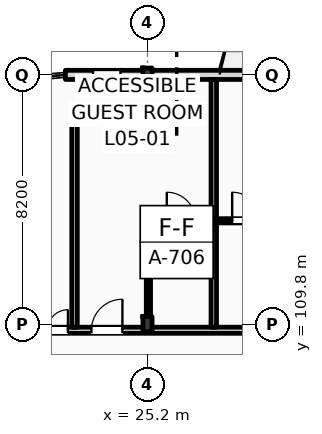
"""IFC4 building model, lengths in metres.
Left out: names, types, materials, properties, quantities, classifications, styles, units other than length and angle.
Written with IfcOpenShell. Run it as: python <this file> out.ifc"""

import sys

from ifc_helpers import new_model, si_unit, direction, frame, frame_2d, origin, origin_2d, place, context, subcontext, project, spatial, rectangle, i_section, extrude, element, fill, save


model = new_model("IFC4")
c1 = context("Model", 3, precision=1e-05, world=origin(), true_north=direction((0.0, 1.0)))
c2 = subcontext(c1, "Body", "Model", "MODEL_VIEW")
j1 = project(units=[si_unit("LENGTHUNIT", "METRE"), si_unit("PLANEANGLEUNIT", "RADIAN")], contexts=[c1])
p1 = place(None, origin())
s1 = spatial("IfcSite", under=j1, at=p1, CompositionType="ELEMENT")
p2 = place(p1, origin())
s2 = spatial("IfcBuilding", under=s1, at=p2, CompositionType="ELEMENT")
p3 = place(p2, frame((0.0, 0.0, 24.6)))
s3 = spatial("IfcBuildingStorey", under=s2, at=p3, CompositionType="ELEMENT", Elevation=24.6)
p4 = place(p3, frame((25.2, 109.8, 0.0), z_axis=(0.0, 0.0, 1.0), x_axis=(1.0, 0.0, 0.0)))
e1 = element("IfcColumn", 1, at=p4, inside=s3, PredefinedType="COLUMN", context=c2, shape_type="SweptSolid", body=[
    extrude(i_section(OverallWidth=0.3, OverallDepth=0.5, WebThickness=0.014, FlangeThickness=0.028, FilletRadius=0.027, at=origin_2d()), origin(), (0.0, 0.0, 1.0), 3.6),
])
p5 = place(p3, frame((25.2, 118.0, 0.0), z_axis=(0.0, 0.0, 1.0), x_axis=(1.0, 0.0, 0.0)))
e2 = element("IfcColumn", 2, at=p5, inside=s3, PredefinedType="COLUMN", context=c2, shape_type="SweptSolid", body=[
    extrude(i_section(OverallWidth=0.3, OverallDepth=0.45, WebThickness=0.014, FlangeThickness=0.026, FilletRadius=0.027, at=origin_2d()), origin(), (0.0, 0.0, 1.0), 3.6),
])
p6 = place(p3, frame((22.5, 118.0, 0.0), z_axis=(0.0, 0.0, 1.0), x_axis=(1.0, 0.0, 0.0)))
e3 = element("IfcWall", 3, at=p6, inside=s3, PredefinedType="STANDARD", context=c2, shape_type="SweptSolid", body=[
    extrude(rectangle(XDim=97.5, YDim=0.3, at=frame_2d((48.75, 0.0))), origin(), (0.0, 0.0, 1.0), 2.78),
])
p7 = place(p6, frame((0.91, 0.0, 0.9)))
e4 = element("IfcOpeningElement", 4, at=p7, cuts=e3, PredefinedType="OPENING", context=c2, shape_type="SweptSolid", body=[
    extrude(rectangle(XDim=0.9, YDim=1.7, at=frame_2d((0.45, 0.85))), frame((0.0, 0.16, 0.0), z_axis=(0.0, -1.0, 0.0), x_axis=(1.0, 0.0, 0.0)), (0.0, 0.0, 1.0), 0.32),
])
p8 = place(p6, frame((6.275, 0.0, 0.0)))
e5 = element("IfcOpeningElement", 5, at=p8, cuts=e3, PredefinedType="OPENING", context=c2, shape_type="SweptSolid", body=[
    extrude(rectangle(XDim=1.2, YDim=2.25, at=frame_2d((0.6, 1.125))), frame((0.0, 0.16, 0.0), z_axis=(0.0, -1.0, 0.0), x_axis=(1.0, 0.0, 0.0)), (0.0, 0.0, 1.0), 0.32),
])
p9 = place(p6, frame((11.42, 0.0, 0.9)))
e6 = element("IfcOpeningElement", 6, at=p9, cuts=e3, PredefinedType="OPENING", context=c2, shape_type="SweptSolid", body=[
    extrude(rectangle(XDim=1.35, YDim=1.7, at=frame_2d((0.675, 0.85))), frame((0.0, 0.16, 0.0), z_axis=(0.0, -1.0, 0.0), x_axis=(1.0, 0.0, 0.0)), (0.0, 0.0, 1.0), 0.32),
])
p10 = place(p6, frame((14.345, 0.0, 0.9)))
e7 = element("IfcOpeningElement", 7, at=p10, cuts=e3, PredefinedType="OPENING", context=c2, shape_type="SweptSolid", body=[
    extrude(rectangle(XDim=1.8, YDim=1.7, at=frame_2d((0.9, 0.85))), frame((0.0, 0.16, 0.0), z_axis=(0.0, -1.0, 0.0), x_axis=(1.0, 0.0, 0.0)), (0.0, 0.0, 1.0), 0.32),
])
p11 = place(p6, frame((19.27, 0.0, 0.9)))
e8 = element("IfcOpeningElement", 8, at=p11, cuts=e3, PredefinedType="OPENING", context=c2, shape_type="SweptSolid", body=[
    extrude(rectangle(XDim=1.95, YDim=1.7, at=frame_2d((0.975, 0.85))), frame((0.0, 0.16, 0.0), z_axis=(0.0, -1.0, 0.0), x_axis=(1.0, 0.0, 0.0)), (0.0, 0.0, 1.0), 0.32),
])
p12 = place(p6, frame((22.97, 0.0, 0.0)))
e9 = element("IfcOpeningElement", 9, at=p12, cuts=e3, PredefinedType="OPENING", context=c2, shape_type="SweptSolid", body=[
    extrude(rectangle(XDim=1.2, YDim=2.25, at=frame_2d((0.6, 1.125))), frame((0.0, 0.16, 0.0), z_axis=(0.0, -1.0, 0.0), x_axis=(1.0, 0.0, 0.0)), (0.0, 0.0, 1.0), 0.32),
])
p13 = place(p6, frame((26.92, 0.0, 0.9)))
e10 = element("IfcOpeningElement", 10, at=p13, cuts=e3, PredefinedType="OPENING", context=c2, shape_type="SweptSolid", body=[
    extrude(rectangle(XDim=2.25, YDim=1.7, at=frame_2d((1.125, 0.85))), frame((0.0, 0.16, 0.0), z_axis=(0.0, -1.0, 0.0), x_axis=(1.0, 0.0, 0.0)), (0.0, 0.0, 1.0), 0.32),
])
p14 = place(p6, frame((30.645, 0.0, 0.9)))
e11 = element("IfcOpeningElement", 11, at=p14, cuts=e3, PredefinedType="OPENING", context=c2, shape_type="SweptSolid", body=[
    extrude(rectangle(XDim=2.4, YDim=1.7, at=frame_2d((1.2, 0.85))), frame((0.0, 0.16, 0.0), z_axis=(0.0, -1.0, 0.0), x_axis=(1.0, 0.0, 0.0)), (0.0, 0.0, 1.0), 0.32),
])
p15 = place(p6, frame((36.71, 0.0, 0.0)))
e12 = element("IfcOpeningElement", 12, at=p15, cuts=e3, PredefinedType="OPENING", context=c2, shape_type="SweptSolid", body=[
    extrude(rectangle(XDim=1.2, YDim=2.25, at=frame_2d((0.6, 1.125))), frame((0.0, 0.16, 0.0), z_axis=(0.0, -1.0, 0.0), x_axis=(1.0, 0.0, 0.0)), (0.0, 0.0, 1.0), 0.32),
])
p16 = place(p6, frame((39.17, 0.0, 0.0)))
e13 = element("IfcOpeningElement", 13, at=p16, cuts=e3, PredefinedType="OPENING", context=c2, shape_type="SweptSolid", body=[
    extrude(rectangle(XDim=1.2, YDim=2.25, at=frame_2d((0.6, 1.125))), frame((0.0, 0.16, 0.0), z_axis=(0.0, -1.0, 0.0), x_axis=(1.0, 0.0, 0.0)), (0.0, 0.0, 1.0), 0.32),
])
p17 = place(p6, frame((43.22, 0.0, 0.9)))
e14 = element("IfcOpeningElement", 14, at=p17, cuts=e3, PredefinedType="OPENING", context=c2, shape_type="SweptSolid", body=[
    extrude(rectangle(XDim=2.85, YDim=1.7, at=frame_2d((1.425, 0.85))), frame((0.0, 0.16, 0.0), z_axis=(0.0, -1.0, 0.0), x_axis=(1.0, 0.0, 0.0)), (0.0, 0.0, 1.0), 0.32),
])
p18 = place(p6, frame((47.29, 0.0, 0.9)))
e15 = element("IfcOpeningElement", 15, at=p18, cuts=e3, PredefinedType="OPENING", context=c2, shape_type="SweptSolid", body=[
    extrude(rectangle(XDim=1.35, YDim=1.7, at=frame_2d((0.675, 0.85))), frame((0.0, 0.16, 0.0), z_axis=(0.0, -1.0, 0.0), x_axis=(1.0, 0.0, 0.0)), (0.0, 0.0, 1.0), 0.32),
])
p19 = place(p6, frame((52.91, 0.0, 0.0)))
e16 = element("IfcOpeningElement", 16, at=p19, cuts=e3, PredefinedType="OPENING", context=c2, shape_type="SweptSolid", body=[
    extrude(rectangle(XDim=1.2, YDim=2.25, at=frame_2d((0.6, 1.125))), frame((0.0, 0.16, 0.0), z_axis=(0.0, -1.0, 0.0), x_axis=(1.0, 0.0, 0.0)), (0.0, 0.0, 1.0), 0.32),
])
p20 = place(p6, frame((55.69, 0.0, 0.9)))
e17 = element("IfcOpeningElement", 17, at=p20, cuts=e3, PredefinedType="OPENING", context=c2, shape_type="SweptSolid", body=[
    extrude(rectangle(XDim=0.9, YDim=1.7, at=frame_2d((0.45, 0.85))), frame((0.0, 0.16, 0.0), z_axis=(0.0, -1.0, 0.0), x_axis=(1.0, 0.0, 0.0)), (0.0, 0.0, 1.0), 0.32),
])
p21 = place(p6, frame((59.82, 0.0, 0.9)))
e18 = element("IfcOpeningElement", 18, at=p21, cuts=e3, PredefinedType="OPENING", context=c2, shape_type="SweptSolid", body=[
    extrude(rectangle(XDim=3.25, YDim=1.7, at=frame_2d((1.625, 0.85))), frame((0.0, 0.16, 0.0), z_axis=(0.0, -1.0, 0.0), x_axis=(1.0, 0.0, 0.0)), (0.0, 0.0, 1.0), 0.32),
])
p22 = place(p6, frame((65.89, 0.0, 0.9)))
e19 = element("IfcOpeningElement", 19, at=p22, cuts=e3, PredefinedType="OPENING", context=c2, shape_type="SweptSolid", body=[
    extrude(rectangle(XDim=1.1, YDim=1.7, at=frame_2d((0.55, 0.85))), frame((0.0, 0.16, 0.0), z_axis=(0.0, -1.0, 0.0), x_axis=(1.0, 0.0, 0.0)), (0.0, 0.0, 1.0), 0.32),
])
p23 = place(p6, frame((69.245, 0.0, 0.0)))
e20 = element("IfcOpeningElement", 20, at=p23, cuts=e3, PredefinedType="OPENING", context=c2, shape_type="SweptSolid", body=[
    extrude(rectangle(XDim=1.2, YDim=2.25, at=frame_2d((0.6, 1.125))), frame((0.0, 0.16, 0.0), z_axis=(0.0, -1.0, 0.0), x_axis=(1.0, 0.0, 0.0)), (0.0, 0.0, 1.0), 0.32),
])
p24 = place(p6, frame((73.69, 0.0, 0.9)))
e21 = element("IfcOpeningElement", 21, at=p24, cuts=e3, PredefinedType="OPENING", context=c2, shape_type="SweptSolid", body=[
    extrude(rectangle(XDim=1.8, YDim=1.7, at=frame_2d((0.9, 0.85))), frame((0.0, 0.16, 0.0), z_axis=(0.0, -1.0, 0.0), x_axis=(1.0, 0.0, 0.0)), (0.0, 0.0, 1.0), 0.32),
])
p25 = place(p6, frame((76.62, 0.0, 0.9)))
e22 = element("IfcOpeningElement", 22, at=p25, cuts=e3, PredefinedType="OPENING", context=c2, shape_type="SweptSolid", body=[
    extrude(rectangle(XDim=3.25, YDim=1.7, at=frame_2d((1.625, 0.85))), frame((0.0, 0.16, 0.0), z_axis=(0.0, -1.0, 0.0), x_axis=(1.0, 0.0, 0.0)), (0.0, 0.0, 1.0), 0.32),
])
p26 = place(p6, frame((81.895, 0.0, 0.9)))
e23 = element("IfcOpeningElement", 23, at=p26, cuts=e3, PredefinedType="OPENING", context=c2, shape_type="SweptSolid", body=[
    extrude(rectangle(XDim=1.1, YDim=1.5, at=frame_2d((0.55, 0.75))), frame((0.0, 0.16, 0.0), z_axis=(0.0, -1.0, 0.0), x_axis=(1.0, 0.0, 0.0)), (0.0, 0.0, 1.0), 0.32),
])
p27 = place(p6, frame((86.02, 0.0, 0.9)))
e24 = element("IfcOpeningElement", 24, at=p27, cuts=e3, PredefinedType="OPENING", context=c2, shape_type="SweptSolid", body=[
    extrude(rectangle(XDim=1.25, YDim=1.6, at=frame_2d((0.625, 0.8))), frame((0.0, 0.16, 0.0), z_axis=(0.0, -1.0, 0.0), x_axis=(1.0, 0.0, 0.0)), (0.0, 0.0, 1.0), 0.32),
])
p28 = place(p6, frame((90.145, 0.0, 0.9)))
e25 = element("IfcOpeningElement", 25, at=p28, cuts=e3, PredefinedType="OPENING", context=c2, shape_type="SweptSolid", body=[
    extrude(rectangle(XDim=1.4, YDim=1.7, at=frame_2d((0.7, 0.85))), frame((0.0, 0.16, 0.0), z_axis=(0.0, -1.0, 0.0), x_axis=(1.0, 0.0, 0.0)), (0.0, 0.0, 1.0), 0.32),
])
p29 = place(p6, frame((94.155, 0.0, 0.9)))
e26 = element("IfcOpeningElement", 26, at=p29, cuts=e3, PredefinedType="OPENING", context=c2, shape_type="SweptSolid", body=[
    extrude(rectangle(XDim=1.6, YDim=1.7, at=frame_2d((0.8, 0.85))), frame((0.0, 0.16, 0.0), z_axis=(0.0, -1.0, 0.0), x_axis=(1.0, 0.0, 0.0)), (0.0, 0.0, 1.0), 0.32),
])
p30 = place(p3, frame((10.65, 109.6, 0.0), z_axis=(0.0, 0.0, 1.0), x_axis=(1.0, 0.0, 0.0)))
e27 = element("IfcWall", 27, at=p30, inside=s3, PredefinedType="PARTITIONING", context=c2, shape_type="SweptSolid", body=[
    extrude(rectangle(XDim=109.21, YDim=0.2, at=frame_2d((54.605, 0.0))), origin(), (0.0, 0.0, 1.0), 2.78),
])
p31 = place(p30, frame((12.705, 0.0, 0.0)))
e28 = element("IfcOpeningElement", 28, at=p31, cuts=e27, PredefinedType="OPENING", context=c2, shape_type="SweptSolid", body=[
    extrude(rectangle(XDim=1.02, YDim=2.2, at=frame_2d((0.51, 1.1))), frame((0.0, 0.11, 0.0), z_axis=(0.0, -1.0, 0.0), x_axis=(1.0, 0.0, 0.0)), (0.0, 0.0, 1.0), 0.22),
])
p32 = place(p30, frame((19.26, 0.0, 0.0)))
e29 = element("IfcOpeningElement", 29, at=p32, cuts=e27, PredefinedType="OPENING", context=c2, shape_type="SweptSolid", body=[
    extrude(rectangle(XDim=1.02, YDim=2.2, at=frame_2d((0.51, 1.1))), frame((0.0, 0.11, 0.0), z_axis=(0.0, -1.0, 0.0), x_axis=(1.0, 0.0, 0.0)), (0.0, 0.0, 1.0), 0.22),
])
p33 = place(p30, frame((23.71, 0.0, 0.0)))
e30 = element("IfcOpeningElement", 30, at=p33, cuts=e27, PredefinedType="OPENING", context=c2, shape_type="SweptSolid", body=[
    extrude(rectangle(XDim=1.02, YDim=2.2, at=frame_2d((0.51, 1.1))), frame((0.0, 0.11, 0.0), z_axis=(0.0, -1.0, 0.0), x_axis=(1.0, 0.0, 0.0)), (0.0, 0.0, 1.0), 0.22),
])
p34 = place(p30, frame((27.66, 0.0, 0.0)))
e31 = element("IfcOpeningElement", 31, at=p34, cuts=e27, PredefinedType="OPENING", context=c2, shape_type="SweptSolid", body=[
    extrude(rectangle(XDim=1.02, YDim=2.2, at=frame_2d((0.51, 1.1))), frame((0.0, 0.11, 0.0), z_axis=(0.0, -1.0, 0.0), x_axis=(1.0, 0.0, 0.0)), (0.0, 0.0, 1.0), 0.22),
])
p35 = place(p30, frame((31.89, 0.0, 0.0)))
e32 = element("IfcOpeningElement", 32, at=p35, cuts=e27, PredefinedType="OPENING", context=c2, shape_type="SweptSolid", body=[
    extrude(rectangle(XDim=0.96, YDim=2.2, at=frame_2d((0.48, 1.1))), frame((0.0, 0.11, 0.0), z_axis=(0.0, -1.0, 0.0), x_axis=(1.0, 0.0, 0.0)), (0.0, 0.0, 1.0), 0.22),
])
p36 = place(p30, frame((33.94, 0.0, 0.0)))
e33 = element("IfcOpeningElement", 33, at=p36, cuts=e27, PredefinedType="OPENING", context=c2, shape_type="SweptSolid", body=[
    extrude(rectangle(XDim=0.96, YDim=2.2, at=frame_2d((0.48, 1.1))), frame((0.0, 0.11, 0.0), z_axis=(0.0, -1.0, 0.0), x_axis=(1.0, 0.0, 0.0)), (0.0, 0.0, 1.0), 0.22),
])
p37 = place(p30, frame((40.29, 0.0, 0.0)))
e34 = element("IfcOpeningElement", 34, at=p37, cuts=e27, PredefinedType="OPENING", context=c2, shape_type="SweptSolid", body=[
    extrude(rectangle(XDim=0.96, YDim=2.2, at=frame_2d((0.48, 1.1))), frame((0.0, 0.11, 0.0), z_axis=(0.0, -1.0, 0.0), x_axis=(1.0, 0.0, 0.0)), (0.0, 0.0, 1.0), 0.22),
])
p38 = place(p30, frame((42.34, 0.0, 0.0)))
e35 = element("IfcOpeningElement", 35, at=p38, cuts=e27, PredefinedType="OPENING", context=c2, shape_type="SweptSolid", body=[
    extrude(rectangle(XDim=0.96, YDim=2.2, at=frame_2d((0.48, 1.1))), frame((0.0, 0.11, 0.0), z_axis=(0.0, -1.0, 0.0), x_axis=(1.0, 0.0, 0.0)), (0.0, 0.0, 1.0), 0.22),
])
p39 = place(p30, frame((48.69, 0.0, 0.0)))
e36 = element("IfcOpeningElement", 36, at=p39, cuts=e27, PredefinedType="OPENING", context=c2, shape_type="SweptSolid", body=[
    extrude(rectangle(XDim=0.96, YDim=2.2, at=frame_2d((0.48, 1.1))), frame((0.0, 0.11, 0.0), z_axis=(0.0, -1.0, 0.0), x_axis=(1.0, 0.0, 0.0)), (0.0, 0.0, 1.0), 0.22),
])
p40 = place(p30, frame((50.74, 0.0, 0.0)))
e37 = element("IfcOpeningElement", 37, at=p40, cuts=e27, PredefinedType="OPENING", context=c2, shape_type="SweptSolid", body=[
    extrude(rectangle(XDim=0.96, YDim=2.2, at=frame_2d((0.48, 1.1))), frame((0.0, 0.11, 0.0), z_axis=(0.0, -1.0, 0.0), x_axis=(1.0, 0.0, 0.0)), (0.0, 0.0, 1.0), 0.22),
])
p41 = place(p30, frame((57.09, 0.0, 0.0)))
e38 = element("IfcOpeningElement", 38, at=p41, cuts=e27, PredefinedType="OPENING", context=c2, shape_type="SweptSolid", body=[
    extrude(rectangle(XDim=0.96, YDim=2.2, at=frame_2d((0.48, 1.1))), frame((0.0, 0.11, 0.0), z_axis=(0.0, -1.0, 0.0), x_axis=(1.0, 0.0, 0.0)), (0.0, 0.0, 1.0), 0.22),
])
p42 = place(p30, frame((59.14, 0.0, 0.0)))
e39 = element("IfcOpeningElement", 39, at=p42, cuts=e27, PredefinedType="OPENING", context=c2, shape_type="SweptSolid", body=[
    extrude(rectangle(XDim=0.96, YDim=2.2, at=frame_2d((0.48, 1.1))), frame((0.0, 0.11, 0.0), z_axis=(0.0, -1.0, 0.0), x_axis=(1.0, 0.0, 0.0)), (0.0, 0.0, 1.0), 0.22),
])
p43 = place(p30, frame((65.49, 0.0, 0.0)))
e40 = element("IfcOpeningElement", 40, at=p43, cuts=e27, PredefinedType="OPENING", context=c2, shape_type="SweptSolid", body=[
    extrude(rectangle(XDim=0.96, YDim=2.2, at=frame_2d((0.48, 1.1))), frame((0.0, 0.11, 0.0), z_axis=(0.0, -1.0, 0.0), x_axis=(1.0, 0.0, 0.0)), (0.0, 0.0, 1.0), 0.22),
])
p44 = place(p30, frame((67.54, 0.0, 0.0)))
e41 = element("IfcOpeningElement", 41, at=p44, cuts=e27, PredefinedType="OPENING", context=c2, shape_type="SweptSolid", body=[
    extrude(rectangle(XDim=0.96, YDim=2.2, at=frame_2d((0.48, 1.1))), frame((0.0, 0.11, 0.0), z_axis=(0.0, -1.0, 0.0), x_axis=(1.0, 0.0, 0.0)), (0.0, 0.0, 1.0), 0.22),
])
p45 = place(p30, frame((73.89, 0.0, 0.0)))
e42 = element("IfcOpeningElement", 42, at=p45, cuts=e27, PredefinedType="OPENING", context=c2, shape_type="SweptSolid", body=[
    extrude(rectangle(XDim=0.96, YDim=2.2, at=frame_2d((0.48, 1.1))), frame((0.0, 0.11, 0.0), z_axis=(0.0, -1.0, 0.0), x_axis=(1.0, 0.0, 0.0)), (0.0, 0.0, 1.0), 0.22),
])
p46 = place(p30, frame((78.09, 0.0, 0.0)))
e43 = element("IfcOpeningElement", 43, at=p46, cuts=e27, PredefinedType="OPENING", context=c2, shape_type="SweptSolid", body=[
    extrude(rectangle(XDim=0.96, YDim=2.2, at=frame_2d((0.48, 1.1))), frame((0.0, 0.11, 0.0), z_axis=(0.0, -1.0, 0.0), x_axis=(1.0, 0.0, 0.0)), (0.0, 0.0, 1.0), 0.22),
])
p47 = place(p30, frame((82.29, 0.0, 0.0)))
e44 = element("IfcOpeningElement", 44, at=p47, cuts=e27, PredefinedType="OPENING", context=c2, shape_type="SweptSolid", body=[
    extrude(rectangle(XDim=0.96, YDim=2.2, at=frame_2d((0.48, 1.1))), frame((0.0, 0.11, 0.0), z_axis=(0.0, -1.0, 0.0), x_axis=(1.0, 0.0, 0.0)), (0.0, 0.0, 1.0), 0.22),
])
p48 = place(p30, frame((86.49, 0.0, 0.0)))
e45 = element("IfcOpeningElement", 45, at=p48, cuts=e27, PredefinedType="OPENING", context=c2, shape_type="SweptSolid", body=[
    extrude(rectangle(XDim=0.96, YDim=2.2, at=frame_2d((0.48, 1.1))), frame((0.0, 0.11, 0.0), z_axis=(0.0, -1.0, 0.0), x_axis=(1.0, 0.0, 0.0)), (0.0, 0.0, 1.0), 0.22),
])
p49 = place(p30, frame((88.54, 0.0, 0.0)))
e46 = element("IfcOpeningElement", 46, at=p49, cuts=e27, PredefinedType="OPENING", context=c2, shape_type="SweptSolid", body=[
    extrude(rectangle(XDim=0.96, YDim=2.2, at=frame_2d((0.48, 1.1))), frame((0.0, 0.11, 0.0), z_axis=(0.0, -1.0, 0.0), x_axis=(1.0, 0.0, 0.0)), (0.0, 0.0, 1.0), 0.22),
])
p50 = place(p30, frame((94.89, 0.0, 0.0)))
e47 = element("IfcOpeningElement", 47, at=p50, cuts=e27, PredefinedType="OPENING", context=c2, shape_type="SweptSolid", body=[
    extrude(rectangle(XDim=0.96, YDim=2.2, at=frame_2d((0.48, 1.1))), frame((0.0, 0.11, 0.0), z_axis=(0.0, -1.0, 0.0), x_axis=(1.0, 0.0, 0.0)), (0.0, 0.0, 1.0), 0.22),
])
p51 = place(p30, frame((96.94, 0.0, 0.0)))
e48 = element("IfcOpeningElement", 48, at=p51, cuts=e27, PredefinedType="OPENING", context=c2, shape_type="SweptSolid", body=[
    extrude(rectangle(XDim=0.96, YDim=2.2, at=frame_2d((0.48, 1.1))), frame((0.0, 0.11, 0.0), z_axis=(0.0, -1.0, 0.0), x_axis=(1.0, 0.0, 0.0)), (0.0, 0.0, 1.0), 0.22),
])
p52 = place(p30, frame((103.29, 0.0, 0.0)))
e49 = element("IfcOpeningElement", 49, at=p52, cuts=e27, PredefinedType="OPENING", context=c2, shape_type="SweptSolid", body=[
    extrude(rectangle(XDim=0.96, YDim=2.2, at=frame_2d((0.48, 1.1))), frame((0.0, 0.11, 0.0), z_axis=(0.0, -1.0, 0.0), x_axis=(1.0, 0.0, 0.0)), (0.0, 0.0, 1.0), 0.22),
])
p53 = place(p30, frame((105.25, 0.0, 0.0)))
e50 = element("IfcOpeningElement", 50, at=p53, cuts=e27, PredefinedType="OPENING", context=c2, shape_type="SweptSolid", body=[
    extrude(rectangle(XDim=0.96, YDim=2.2, at=frame_2d((0.48, 1.1))), frame((0.0, 0.11, 0.0), z_axis=(0.0, -1.0, 0.0), x_axis=(1.0, 0.0, 0.0)), (0.0, 0.0, 1.0), 0.22),
])
p54 = place(p30, frame((2.716, 0.0, 0.0)))
e51 = element("IfcOpeningElement", 51, at=p54, cuts=e27, PredefinedType="OPENING", context=c2, shape_type="SweptSolid", body=[
    extrude(rectangle(XDim=1.35, YDim=2.25, at=frame_2d((0.675, 1.125))), frame((0.0, 0.11, 0.0), z_axis=(0.0, -1.0, 0.0), x_axis=(1.0, 0.0, 0.0)), (0.0, 0.0, 1.0), 0.22),
])
p55 = place(p30, frame((6.65, 0.0, 0.0)))
e52 = element("IfcOpeningElement", 52, at=p55, cuts=e27, PredefinedType="OPENING", context=c2, shape_type="SweptSolid", body=[
    extrude(rectangle(XDim=1.35, YDim=2.25, at=frame_2d((0.675, 1.125))), frame((0.0, 0.11, 0.0), z_axis=(0.0, -1.0, 0.0), x_axis=(1.0, 0.0, 0.0)), (0.0, 0.0, 1.0), 0.22),
])
p56 = place(p30, frame((10.583, 0.0, 0.0)))
e53 = element("IfcOpeningElement", 53, at=p56, cuts=e27, PredefinedType="OPENING", context=c2, shape_type="SweptSolid", body=[
    extrude(rectangle(XDim=1.35, YDim=2.25, at=frame_2d((0.675, 1.125))), frame((0.0, 0.11, 0.0), z_axis=(0.0, -1.0, 0.0), x_axis=(1.0, 0.0, 0.0)), (0.0, 0.0, 1.0), 0.22),
])
p57 = place(p3, frame((27.38, 109.7, 0.0), z_axis=(0.0, 0.0, 1.0), x_axis=(0.0, 1.0, 0.0)))
e54 = element("IfcWall", 54, at=p57, inside=s3, PredefinedType="PARTITIONING", context=c2, shape_type="SweptSolid", body=[
    extrude(rectangle(XDim=8.15, YDim=0.18, at=frame_2d((4.075, 0.0))), origin(), (0.0, 0.0, 1.0), 3.34),
])
p58 = place(p3, frame((25.23, 109.7, 0.0), z_axis=(0.0, 0.0, 1.0), x_axis=(0.0, 1.0, 0.0)))
e55 = element("IfcWall", 55, at=p58, inside=s3, PredefinedType="PARTITIONING", context=c2, shape_type="SweptSolid", body=[
    extrude(rectangle(XDim=3.5, YDim=0.14, at=frame_2d((1.75, 0.0))), origin(), (0.0, 0.0, 1.0), 2.93),
])
p59 = place(p3, frame((25.23, 113.2, 0.0), z_axis=(0.0, 0.0, 1.0), x_axis=(1.0, 0.0, 0.0)))
e56 = element("IfcWall", 56, at=p59, inside=s3, PredefinedType="PARTITIONING", context=c2, shape_type="SweptSolid", body=[
    extrude(rectangle(XDim=2.15, YDim=0.14, at=frame_2d((1.075, 0.0))), origin(), (0.0, 0.0, 1.0), 3.34),
])
p60 = place(p59, frame((0.605, 0.0, 0.0)))
e57 = element("IfcOpeningElement", 57, at=p60, cuts=e56, PredefinedType="OPENING", context=c2, shape_type="SweptSolid", body=[
    extrude(rectangle(XDim=0.94, YDim=2.15, at=frame_2d((0.47, 1.075))), frame((0.0, 0.08, 0.0), z_axis=(0.0, -1.0, 0.0), x_axis=(1.0, 0.0, 0.0)), (0.0, 0.0, 1.0), 0.16),
])
p61 = place(p3, frame((27.38, 113.2, 0.0), z_axis=(0.0, 0.0, 1.0), x_axis=(1.0, 0.0, 0.0)))
e58 = element("IfcWall", 58, at=p61, inside=s3, PredefinedType="PARTITIONING", context=c2, shape_type="SweptSolid", body=[
    extrude(rectangle(XDim=2.15, YDim=0.14, at=frame_2d((1.075, 0.0))), origin(), (0.0, 0.0, 1.0), 3.34),
])
p62 = place(p61, frame((0.605, 0.0, 0.0)))
e59 = element("IfcOpeningElement", 59, at=p62, cuts=e58, PredefinedType="OPENING", context=c2, shape_type="SweptSolid", body=[
    extrude(rectangle(XDim=0.94, YDim=2.15, at=frame_2d((0.47, 1.075))), frame((0.0, 0.08, 0.0), z_axis=(0.0, -1.0, 0.0), x_axis=(1.0, 0.0, 0.0)), (0.0, 0.0, 1.0), 0.16),
])
p63 = place(p3, frame((22.8, 109.7, 0.0), z_axis=(0.0, 0.0, 1.0), x_axis=(0.0, 1.0, 0.0)))
e60 = element("IfcWall", 60, at=p63, inside=s3, PredefinedType="PARTITIONING", context=c2, shape_type="SweptSolid", body=[
    extrude(rectangle(XDim=7.2, YDim=0.18, at=frame_2d((3.6, 0.0))), origin(), (0.0, 0.0, 1.0), 3.34),
])
p64 = place(p7, origin())
e61 = element("IfcWindow", 61, at=p64, inside=s3, PartitioningType="DOUBLE_PANEL_VERTICAL", PredefinedType="WINDOW", context=c2, shape_type="SweptSolid", body=[
    extrude(rectangle(XDim=0.9, YDim=1.7, at=frame_2d((0.45, 0.85))), frame((0.0, 0.03, 0.0), z_axis=(0.0, -1.0, 0.0), x_axis=(1.0, 0.0, 0.0)), (0.0, 0.0, 1.0), 0.06),
])
fill(e4, e61)
p65 = place(p31, origin())
e62 = element("IfcDoor", 62, at=p65, inside=s3, OperationType="SINGLE_SWING_RIGHT", PredefinedType="DOOR", context=c2, shape_type="SweptSolid", body=[
    extrude(rectangle(XDim=1.02, YDim=2.2, at=frame_2d((0.51, 1.1))), frame((0.0, 0.025, 0.0), z_axis=(0.0, -1.0, 0.0), x_axis=(1.0, 0.0, 0.0)), (0.0, 0.0, 1.0), 0.05),
])
fill(e28, e62)
p66 = place(p60, origin())
e63 = element("IfcDoor", 63, at=p66, inside=s3, OperationType="SINGLE_SWING_LEFT", PredefinedType="DOOR", context=c2, shape_type="SweptSolid", body=[
    extrude(rectangle(XDim=0.94, YDim=2.15, at=frame_2d((0.47, 1.075))), frame((0.0, 0.025, 0.0), z_axis=(0.0, -1.0, 0.0), x_axis=(1.0, 0.0, 0.0)), (0.0, 0.0, 1.0), 0.05),
])
fill(e57, e63)
p67 = place(p62, origin())
e64 = element("IfcDoor", 64, at=p67, inside=s3, OperationType="SINGLE_SWING_LEFT", PredefinedType="DOOR", context=c2, shape_type="SweptSolid", body=[
    extrude(rectangle(XDim=0.94, YDim=2.15, at=frame_2d((0.47, 1.075))), frame((0.0, 0.025, 0.0), z_axis=(0.0, -1.0, 0.0), x_axis=(1.0, 0.0, 0.0)), (0.0, 0.0, 1.0), 0.05),
])
fill(e59, e64)
p68 = place(p56, origin())
e65 = element("IfcDoor", 65, at=p68, inside=s3, OperationType="DOUBLE_SWING_LEFT", PredefinedType="DOOR", context=c2, shape_type="SweptSolid", body=[
    extrude(rectangle(XDim=1.35, YDim=2.25, at=frame_2d((0.675, 1.125))), frame((0.0, 0.025, 0.0), z_axis=(0.0, -1.0, 0.0), x_axis=(1.0, 0.0, 0.0)), (0.0, 0.0, 1.0), 0.05),
])
fill(e53, e65)
save(model, sys.argv[1])
